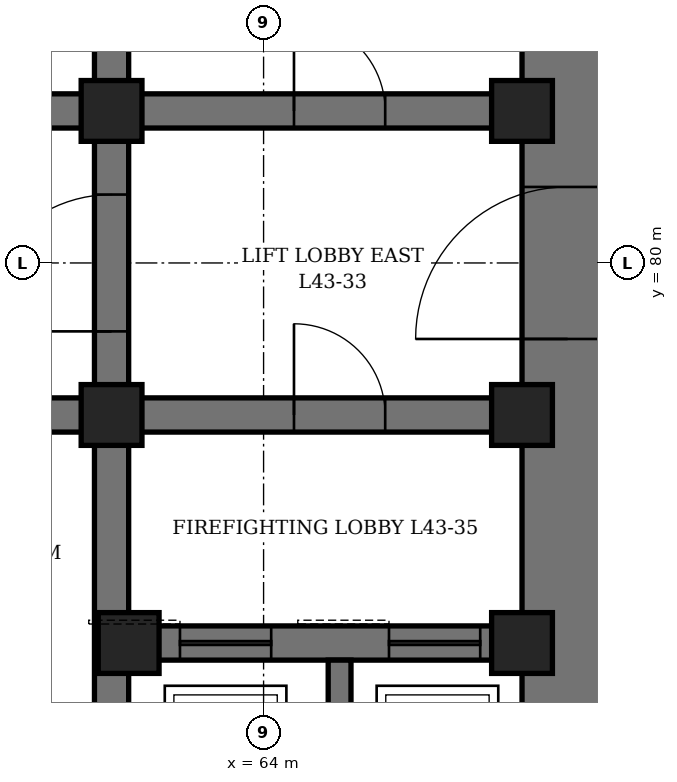
"""IFC4 building model, lengths in metres.
Left out: names, types, materials, properties, quantities, classifications, styles, units other than length and angle.
Written with IfcOpenShell. Run it as: python <this file> out.ifc"""

import sys

from ifc_helpers import new_model, si_unit, direction, frame, frame_2d, origin, origin_2d, place, context, subcontext, project, spatial, rectangle, hollow_rectangle, extrude, element, fill, save


model = new_model("IFC4")
c1 = context("Model", 3, precision=1e-05, world=origin(), true_north=direction((0.0, 1.0)))
c2 = subcontext(c1, "Body", "Model", "MODEL_VIEW")
j1 = project(units=[si_unit("LENGTHUNIT", "METRE"), si_unit("PLANEANGLEUNIT", "RADIAN")], contexts=[c1])
p1 = place(None, origin())
s1 = spatial("IfcSite", under=j1, at=p1, CompositionType="ELEMENT")
p2 = place(p1, origin())
s2 = spatial("IfcBuilding", under=s1, at=p2, CompositionType="ELEMENT")
p3 = place(p2, frame((0.0, 0.0, 193.9)))
s3 = spatial("IfcBuildingStorey", under=s2, at=p3, CompositionType="ELEMENT", Elevation=193.9)
p4 = place(p3, frame((68.0, 70.4, 0.0), z_axis=(0.0, 0.0, 1.0), x_axis=(0.0, 1.0, 0.0)))
e1 = element("IfcWall", 1, at=p4, inside=s3, PredefinedType="SHEAR", context=c2, shape_type="SweptSolid", body=[
    extrude(rectangle(XDim=19.2, YDim=1.2, at=frame_2d((9.6, 0.0))), origin(), (0.0, 0.0, 1.0), 4.2),
])
p5 = place(p4, frame((8.6, 0.0, 0.0)))
e2 = element("IfcOpeningElement", 2, at=p5, cuts=e1, PredefinedType="OPENING", context=c2, shape_type="SweptSolid", body=[
    extrude(rectangle(XDim=2.0, YDim=2.4, at=frame_2d((1.0, 1.2))), frame((0.0, 0.61, 0.0), z_axis=(0.0, -1.0, 0.0), x_axis=(1.0, 0.0, 0.0)), (0.0, 0.0, 1.0), 1.22),
])
p6 = place(p3, frame((62.0, 71.6, 0.0), z_axis=(0.0, 0.0, 1.0), x_axis=(0.0, 1.0, 0.0)))
e3 = element("IfcWall", 3, at=p6, inside=s3, PredefinedType="SHEAR", context=c2, shape_type="SweptSolid", body=[
    extrude(rectangle(XDim=16.8, YDim=0.45, at=frame_2d((8.4, 0.0))), origin(), (0.0, 0.0, 1.0), 4.2),
])
p7 = place(p6, frame((7.5, 0.0, 0.0)))
e4 = element("IfcOpeningElement", 4, at=p7, cuts=e3, PredefinedType="OPENING", context=c2, shape_type="SweptSolid", body=[
    extrude(rectangle(XDim=1.8, YDim=2.4, at=frame_2d((0.9, 1.2))), frame((0.0, 0.235, 0.0), z_axis=(0.0, -1.0, 0.0), x_axis=(1.0, 0.0, 0.0)), (0.0, 0.0, 1.0), 0.47),
])
p8 = place(p3, frame((62.225, 75.0, 0.0), z_axis=(0.0, 0.0, 1.0), x_axis=(1.0, 0.0, 0.0)))
e5 = element("IfcWall", 5, at=p8, inside=s3, PredefinedType="SHEAR", context=c2, shape_type="SweptSolid", body=[
    extrude(rectangle(XDim=5.175, YDim=0.45, at=frame_2d((2.587, 0.0))), origin(), (0.0, 0.0, 1.0), 4.2),
])
p9 = place(p8, frame((0.675, 0.0, 0.0)))
e6 = element("IfcOpeningElement", 6, at=p9, cuts=e5, PredefinedType="OPENING", context=c2, shape_type="SweptSolid", body=[
    extrude(rectangle(XDim=1.2, YDim=2.2, at=frame_2d((0.6, 1.1))), frame((0.0, 0.235, 0.0), z_axis=(0.0, -1.0, 0.0), x_axis=(1.0, 0.0, 0.0)), (0.0, 0.0, 1.0), 0.47),
])
p10 = place(p8, frame((3.425, 0.0, 0.0)))
e7 = element("IfcOpeningElement", 7, at=p10, cuts=e5, PredefinedType="OPENING", context=c2, shape_type="SweptSolid", body=[
    extrude(rectangle(XDim=1.2, YDim=2.2, at=frame_2d((0.6, 1.1))), frame((0.0, 0.235, 0.0), z_axis=(0.0, -1.0, 0.0), x_axis=(1.0, 0.0, 0.0)), (0.0, 0.0, 1.0), 0.47),
])
p11 = place(p3, frame((62.225, 78.0, 0.0), z_axis=(0.0, 0.0, 1.0), x_axis=(1.0, 0.0, 0.0)))
e8 = element("IfcWall", 8, at=p11, inside=s3, PredefinedType="SHEAR", context=c2, shape_type="SweptSolid", body=[
    extrude(rectangle(XDim=5.175, YDim=0.45, at=frame_2d((2.587, 0.0))), origin(), (0.0, 0.0, 1.0), 4.2),
])
p12 = place(p11, frame((2.175, 0.0, 0.0)))
e9 = element("IfcOpeningElement", 9, at=p12, cuts=e8, PredefinedType="OPENING", context=c2, shape_type="SweptSolid", body=[
    extrude(rectangle(XDim=1.2, YDim=2.1, at=frame_2d((0.6, 1.05))), frame((0.0, 0.235, 0.0), z_axis=(0.0, -1.0, 0.0), x_axis=(1.0, 0.0, 0.0)), (0.0, 0.0, 1.0), 0.47),
])
p13 = place(p3, frame((62.225, 82.0, 0.0), z_axis=(0.0, 0.0, 1.0), x_axis=(1.0, 0.0, 0.0)))
e10 = element("IfcWall", 10, at=p13, inside=s3, PredefinedType="SHEAR", context=c2, shape_type="SweptSolid", body=[
    extrude(rectangle(XDim=5.175, YDim=0.45, at=frame_2d((2.587, 0.0))), origin(), (0.0, 0.0, 1.0), 4.2),
])
p14 = place(p13, frame((2.175, 0.0, 0.0)))
e11 = element("IfcOpeningElement", 11, at=p14, cuts=e10, PredefinedType="OPENING", context=c2, shape_type="SweptSolid", body=[
    extrude(rectangle(XDim=1.2, YDim=2.1, at=frame_2d((0.6, 1.05))), frame((0.0, 0.235, 0.0), z_axis=(0.0, -1.0, 0.0), x_axis=(1.0, 0.0, 0.0)), (0.0, 0.0, 1.0), 0.47),
])
p15 = place(p3, frame((50.225, 78.0, 0.0), z_axis=(0.0, 0.0, 1.0), x_axis=(1.0, 0.0, 0.0)))
e12 = element("IfcWall", 12, at=p15, inside=s3, PredefinedType="SHEAR", context=c2, shape_type="SweptSolid", body=[
    extrude(rectangle(XDim=11.55, YDim=0.45, at=frame_2d((5.775, 0.0))), origin(), (0.0, 0.0, 1.0), 4.2),
])
p16 = place(p15, frame((0.825, 0.0, 0.0)))
e13 = element("IfcOpeningElement", 13, at=p16, cuts=e12, PredefinedType="OPENING", context=c2, shape_type="SweptSolid", body=[
    extrude(rectangle(XDim=0.9, YDim=2.1, at=frame_2d((0.45, 1.05))), frame((0.0, 0.235, 0.0), z_axis=(0.0, -1.0, 0.0), x_axis=(1.0, 0.0, 0.0)), (0.0, 0.0, 1.0), 0.47),
])
p17 = place(p15, frame((3.825, 0.0, 0.0)))
e14 = element("IfcOpeningElement", 14, at=p17, cuts=e12, PredefinedType="OPENING", context=c2, shape_type="SweptSolid", body=[
    extrude(rectangle(XDim=0.9, YDim=2.1, at=frame_2d((0.45, 1.05))), frame((0.0, 0.235, 0.0), z_axis=(0.0, -1.0, 0.0), x_axis=(1.0, 0.0, 0.0)), (0.0, 0.0, 1.0), 0.47),
])
p18 = place(p15, frame((6.825, 0.0, 0.0)))
e15 = element("IfcOpeningElement", 15, at=p18, cuts=e12, PredefinedType="OPENING", context=c2, shape_type="SweptSolid", body=[
    extrude(rectangle(XDim=0.9, YDim=2.1, at=frame_2d((0.45, 1.05))), frame((0.0, 0.235, 0.0), z_axis=(0.0, -1.0, 0.0), x_axis=(1.0, 0.0, 0.0)), (0.0, 0.0, 1.0), 0.47),
])
p19 = place(p15, frame((9.825, 0.0, 0.0)))
e16 = element("IfcOpeningElement", 16, at=p19, cuts=e12, PredefinedType="OPENING", context=c2, shape_type="SweptSolid", body=[
    extrude(rectangle(XDim=0.9, YDim=2.1, at=frame_2d((0.45, 1.05))), frame((0.0, 0.235, 0.0), z_axis=(0.0, -1.0, 0.0), x_axis=(1.0, 0.0, 0.0)), (0.0, 0.0, 1.0), 0.47),
])
p20 = place(p3, frame((50.225, 82.0, 0.0), z_axis=(0.0, 0.0, 1.0), x_axis=(1.0, 0.0, 0.0)))
e17 = element("IfcWall", 17, at=p20, inside=s3, PredefinedType="SHEAR", context=c2, shape_type="SweptSolid", body=[
    extrude(rectangle(XDim=11.55, YDim=0.45, at=frame_2d((5.775, 0.0))), origin(), (0.0, 0.0, 1.0), 4.2),
])
p21 = place(p20, frame((0.825, 0.0, 0.0)))
e18 = element("IfcOpeningElement", 18, at=p21, cuts=e17, PredefinedType="OPENING", context=c2, shape_type="SweptSolid", body=[
    extrude(rectangle(XDim=0.9, YDim=2.1, at=frame_2d((0.45, 1.05))), frame((0.0, 0.235, 0.0), z_axis=(0.0, -1.0, 0.0), x_axis=(1.0, 0.0, 0.0)), (0.0, 0.0, 1.0), 0.47),
])
p22 = place(p20, frame((3.825, 0.0, 0.0)))
e19 = element("IfcOpeningElement", 19, at=p22, cuts=e17, PredefinedType="OPENING", context=c2, shape_type="SweptSolid", body=[
    extrude(rectangle(XDim=0.9, YDim=2.1, at=frame_2d((0.45, 1.05))), frame((0.0, 0.235, 0.0), z_axis=(0.0, -1.0, 0.0), x_axis=(1.0, 0.0, 0.0)), (0.0, 0.0, 1.0), 0.47),
])
p23 = place(p20, frame((6.825, 0.0, 0.0)))
e20 = element("IfcOpeningElement", 20, at=p23, cuts=e17, PredefinedType="OPENING", context=c2, shape_type="SweptSolid", body=[
    extrude(rectangle(XDim=0.9, YDim=2.1, at=frame_2d((0.45, 1.05))), frame((0.0, 0.235, 0.0), z_axis=(0.0, -1.0, 0.0), x_axis=(1.0, 0.0, 0.0)), (0.0, 0.0, 1.0), 0.47),
])
p24 = place(p20, frame((9.825, 0.0, 0.0)))
e21 = element("IfcOpeningElement", 21, at=p24, cuts=e17, PredefinedType="OPENING", context=c2, shape_type="SweptSolid", body=[
    extrude(rectangle(XDim=0.9, YDim=2.1, at=frame_2d((0.45, 1.05))), frame((0.0, 0.235, 0.0), z_axis=(0.0, -1.0, 0.0), x_axis=(1.0, 0.0, 0.0)), (0.0, 0.0, 1.0), 0.47),
])
p25 = place(p3, frame((65.0, 71.6, 0.0), z_axis=(0.0, 0.0, 1.0), x_axis=(0.0, 1.0, 0.0)))
e22 = element("IfcWall", 22, at=p25, inside=s3, PredefinedType="SHEAR", context=c2, shape_type="SweptSolid", body=[
    extrude(rectangle(XDim=3.175, YDim=0.3, at=frame_2d((1.587, 0.0))), origin(), (0.0, 0.0, 1.0), 4.2),
])
for number, where, z_axis, x_axis in (
    (23, (62.0, 78.0, 0.0), (0.0, 0.0, 1.0), (1.0, 0.0, 0.0)),
    (24, (62.0, 82.0, 0.0), (0.0, 0.0, 1.0), (1.0, 0.0, 0.0)),
    (25, (62.225, 75.0, 0.0), (0.0, 0.0, 1.0), (1.0, 0.0, 0.0)),
    (26, (67.4, 75.0, 0.0), (0.0, 0.0, 1.0), (1.0, 0.0, 0.0)),
    (27, (67.4, 78.0, 0.0), (0.0, 0.0, 1.0), (1.0, 0.0, 0.0)),
    (28, (67.4, 82.0, 0.0), (0.0, 0.0, 1.0), (1.0, 0.0, 0.0)),
):
    element("IfcColumn", number, at=place(p3, frame(where, z_axis=z_axis, x_axis=x_axis)), inside=s3, PredefinedType="COLUMN", context=c2, shape_type="SweptSolid", body=[
        extrude(hollow_rectangle(XDim=0.8, YDim=0.8, WallThickness=0.1, at=origin_2d()), origin(), (0.0, 0.0, 1.0), 4.2),
    ])
p26 = place(p14, origin())
e29 = element("IfcDoor", 29, at=p26, inside=s3, OperationType="SINGLE_SWING_LEFT", PredefinedType="DOOR", context=c2, shape_type="SweptSolid", body=[
    extrude(rectangle(XDim=1.2, YDim=2.1, at=frame_2d((0.6, 1.05))), frame((0.0, 0.225, 0.0), z_axis=(0.0, -1.0, 0.0), x_axis=(1.0, 0.0, 0.0)), (0.0, 0.0, 1.0), 0.449),
])
fill(e11, e29)
p27 = place(p5, origin())
e30 = element("IfcDoor", 30, at=p27, inside=s3, OperationType="DOUBLE_DOOR_SINGLE_SWING", PredefinedType="DOOR", context=c2, shape_type="SweptSolid", body=[
    extrude(rectangle(XDim=2.0, YDim=2.4, at=frame_2d((1.0, 1.2))), frame((0.0, 0.35, 0.0), z_axis=(0.0, -1.0, 0.0), x_axis=(1.0, 0.0, 0.0)), (0.0, 0.0, 1.0), 0.7),
])
fill(e2, e30)
p28 = place(p7, origin())
e31 = element("IfcDoor", 31, at=p28, inside=s3, OperationType="DOUBLE_DOOR_SINGLE_SWING", PredefinedType="DOOR", context=c2, shape_type="SweptSolid", body=[
    extrude(rectangle(XDim=1.8, YDim=2.4, at=frame_2d((0.9, 1.2))), frame((0.0, 0.225, 0.0), z_axis=(0.0, -1.0, 0.0), x_axis=(1.0, 0.0, 0.0)), (0.0, 0.0, 1.0), 0.449),
])
fill(e4, e31)
p29 = place(p12, origin())
e32 = element("IfcDoor", 32, at=p29, inside=s3, OperationType="SINGLE_SWING_RIGHT", PredefinedType="DOOR", context=c2, shape_type="SweptSolid", body=[
    extrude(rectangle(XDim=1.2, YDim=2.1, at=frame_2d((0.6, 1.05))), frame((0.0, 0.225, 0.0), z_axis=(0.0, -1.0, 0.0), x_axis=(1.0, 0.0, 0.0)), (0.0, 0.0, 1.0), 0.449),
])
fill(e9, e32)
p30 = place(p9, origin())
e33 = element("IfcDoor", 33, at=p30, inside=s3, OperationType="SLIDING_TO_LEFT", PredefinedType="DOOR", context=c2, shape_type="SweptSolid", body=[
    extrude(rectangle(XDim=1.2, YDim=2.2, at=frame_2d((0.6, 1.1))), frame((0.0, 0.225, 0.0), z_axis=(0.0, -1.0, 0.0), x_axis=(1.0, 0.0, 0.0)), (0.0, 0.0, 1.0), 0.449),
])
fill(e6, e33)
p31 = place(p10, origin())
e34 = element("IfcDoor", 34, at=p31, inside=s3, OperationType="SLIDING_TO_LEFT", PredefinedType="DOOR", context=c2, shape_type="SweptSolid", body=[
    extrude(rectangle(XDim=1.2, YDim=2.2, at=frame_2d((0.6, 1.1))), frame((0.0, 0.225, 0.0), z_axis=(0.0, -1.0, 0.0), x_axis=(1.0, 0.0, 0.0)), (0.0, 0.0, 1.0), 0.449),
])
fill(e7, e34)
save(model, sys.argv[1])
